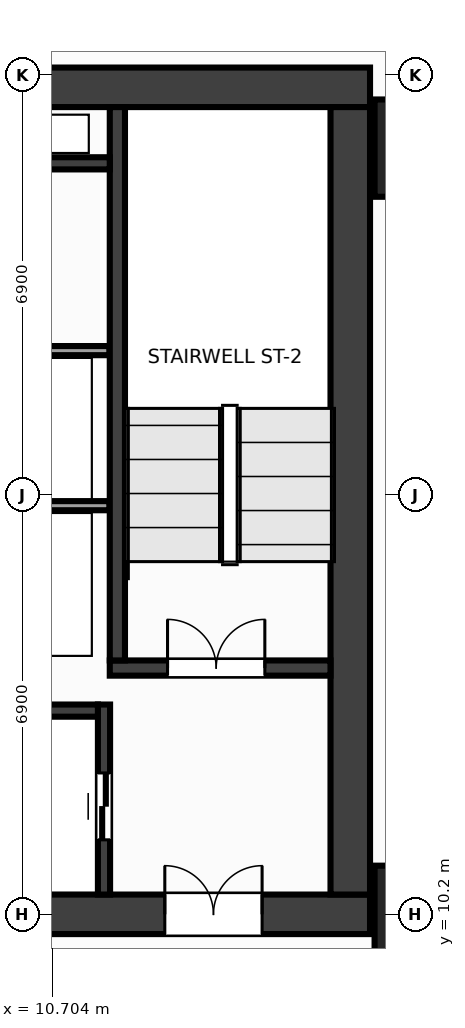
"""IFC4 building model, lengths in metres.
Left out: names, types, materials, properties, quantities, classifications, styles, units other than length and angle.
Written with IfcOpenShell. Run it as: python <this file> out.ifc"""

import sys

from ifc_helpers import new_model, si_unit, direction, frame, frame_2d, origin, origin_2d, place, context, subcontext, project, spatial, rectangle, extrude, source, transform, mapped, element, fill, save


model = new_model("IFC4")
c1 = context("Model", 3, precision=1e-05, world=origin(), true_north=direction((0.0, 1.0)))
c2 = subcontext(c1, "Body", "Model", "MODEL_VIEW")
j1 = project(units=[si_unit("LENGTHUNIT", "METRE"), si_unit("PLANEANGLEUNIT", "RADIAN")], contexts=[c1])
p1 = place(None, origin())
s1 = spatial("IfcSite", under=j1, at=p1, CompositionType="ELEMENT")
p2 = place(p1, origin())
s2 = spatial("IfcBuilding", under=s1, at=p2, CompositionType="ELEMENT")
p3 = place(p2, frame((0.0, 0.0, 138.8)))
s3 = spatial("IfcBuildingStorey", under=s2, at=p3, CompositionType="ELEMENT", Elevation=138.8)
m1 = source(origin(), c2, "Body", "SweptSolid", [
    extrude(rectangle(XDim=31.85, YDim=0.65, at=frame_2d((15.925, 0.0))), origin(), (0.0, 0.0, 1.0), 3.6),
])
p4 = place(p3, frame((-15.925, 23.8, 0.0), z_axis=(0.0, 0.0, 1.0), x_axis=(1.0, 0.0, 0.0)))
e1 = element("IfcWall", 1, at=p4, inside=s3, PredefinedType="SHEAR", context=c2, shape_type="MappedRepresentation", body=[
    mapped(m1, transform((0.0, 0.0, 0.0), x_axis=(1.0, 0.0, 0.0), y_axis=(0.0, 1.0, 0.0), z_axis=(0.0, 0.0, 1.0), scale=1.0)),
])
p5 = place(p3, frame((-15.925, 10.2, 0.0), z_axis=(0.0, 0.0, 1.0), x_axis=(1.0, 0.0, 0.0)))
e2 = element("IfcWall", 2, at=p5, inside=s3, PredefinedType="SHEAR", context=c2, shape_type="MappedRepresentation", body=[
    mapped(m1, transform((0.0, 0.0, 0.0), x_axis=(1.0, 0.0, 0.0), y_axis=(0.0, 1.0, 0.0), z_axis=(0.0, 0.0, 1.0), scale=1.0)),
])
p6 = place(p5, frame((1.775, 0.0, 0.0)))
e3 = element("IfcOpeningElement", 3, at=p6, cuts=e2, PredefinedType="OPENING", context=c2, shape_type="SweptSolid", body=[
    extrude(rectangle(XDim=1.6, YDim=2.15, at=frame_2d((0.8, 1.075))), frame((0.0, 0.337, 0.0), z_axis=(0.0, -1.0, 0.0), x_axis=(1.0, 0.0, 0.0)), (0.0, 0.0, 1.0), 0.674),
])
p7 = place(p5, frame((28.475, 0.0, 0.0)))
e4 = element("IfcOpeningElement", 4, at=p7, cuts=e2, PredefinedType="OPENING", context=c2, shape_type="SweptSolid", body=[
    extrude(rectangle(XDim=1.6, YDim=2.15, at=frame_2d((0.8, 1.075))), frame((0.0, 0.337, 0.0), z_axis=(0.0, -1.0, 0.0), x_axis=(1.0, 0.0, 0.0)), (0.0, 0.0, 1.0), 0.674),
])
p8 = place(p5, frame((15.175, 0.0, 0.0)))
e5 = element("IfcOpeningElement", 5, at=p8, cuts=e2, PredefinedType="OPENING", context=c2, shape_type="SweptSolid", body=[
    extrude(rectangle(XDim=1.5, YDim=2.2, at=frame_2d((0.75, 1.1))), frame((0.0, 0.337, 0.0), z_axis=(0.0, -1.0, 0.0), x_axis=(1.0, 0.0, 0.0)), (0.0, 0.0, 1.0), 0.674),
])
m2 = source(origin(), c2, "Body", "SweptSolid", [
    extrude(rectangle(XDim=12.95, YDim=0.65, at=frame_2d((6.475, 0.0))), origin(), (0.0, 0.0, 1.0), 3.6),
])
p9 = place(p3, frame((15.6, 10.525, 0.0), z_axis=(0.0, 0.0, 1.0), x_axis=(0.0, 1.0, 0.0)))
e6 = element("IfcWall", 6, at=p9, inside=s3, PredefinedType="SHEAR", context=c2, shape_type="MappedRepresentation", body=[
    mapped(m2, transform((0.0, 0.0, 0.0), x_axis=(1.0, 0.0, 0.0), y_axis=(0.0, 1.0, 0.0), z_axis=(0.0, 0.0, 1.0), scale=1.0)),
])
m3 = source(origin(), c2, "Body", "SweptSolid", [
    extrude(rectangle(XDim=3.63, YDim=0.25, at=frame_2d((1.815, 0.0))), origin(), (0.0, 0.0, 1.0), 3.6),
])
p10 = place(p3, frame((11.645, 14.25, 0.0), z_axis=(0.0, 0.0, 1.0), x_axis=(1.0, 0.0, 0.0)))
e7 = element("IfcWall", 7, at=p10, inside=s3, PredefinedType="SHEAR", context=c2, shape_type="MappedRepresentation", body=[
    mapped(m3, transform((0.0, 0.0, 0.0), x_axis=(1.0, 0.0, 0.0), y_axis=(0.0, 1.0, 0.0), z_axis=(0.0, 0.0, 1.0), scale=1.0)),
])
p11 = place(p10, frame((0.95, 0.0, 0.0)))
e8 = element("IfcOpeningElement", 8, at=p11, cuts=e7, PredefinedType="OPENING", context=c2, shape_type="SweptSolid", body=[
    extrude(rectangle(XDim=1.6, YDim=2.15, at=frame_2d((0.8, 1.075))), frame((0.0, 0.137, 0.0), z_axis=(0.0, -1.0, 0.0), x_axis=(1.0, 0.0, 0.0)), (0.0, 0.0, 1.0), 0.274),
])
m4 = source(origin(), c2, "Body", "SweptSolid", [
    extrude(rectangle(XDim=9.1, YDim=0.25, at=frame_2d((4.55, 0.0))), origin(), (0.0, 0.0, 1.0), 3.6),
])
p12 = place(p3, frame((11.77, 14.375, 0.0), z_axis=(0.0, 0.0, 1.0), x_axis=(0.0, 1.0, 0.0)))
e9 = element("IfcWall", 9, at=p12, inside=s3, PredefinedType="SHEAR", context=c2, shape_type="MappedRepresentation", body=[
    mapped(m4, transform((0.0, 0.0, 0.0), x_axis=(1.0, 0.0, 0.0), y_axis=(0.0, 1.0, 0.0), z_axis=(0.0, 0.0, 1.0), scale=1.0)),
])
m5 = source(origin(), c2, "Body", "SweptSolid", [
    extrude(rectangle(XDim=3.125, YDim=0.2, at=frame_2d((1.562, 0.0))), origin(), (0.0, 0.0, 1.0), 3.6),
])
p13 = place(p3, frame((11.55, 10.525, 0.0), z_axis=(0.0, 0.0, 1.0), x_axis=(0.0, 1.0, 0.0)))
e10 = element("IfcWall", 10, at=p13, inside=s3, PredefinedType="SHEAR", context=c2, shape_type="MappedRepresentation", body=[
    mapped(m5, transform((0.0, 0.0, 0.0), x_axis=(1.0, 0.0, 0.0), y_axis=(0.0, 1.0, 0.0), z_axis=(0.0, 0.0, 1.0), scale=1.0)),
])
p14 = place(p13, frame((0.9, 0.0, 0.0)))
e11 = element("IfcOpeningElement", 11, at=p14, cuts=e10, PredefinedType="OPENING", context=c2, shape_type="SweptSolid", body=[
    extrude(rectangle(XDim=1.1, YDim=2.15, at=frame_2d((0.55, 1.075))), frame((0.0, 0.112, 0.0), z_axis=(0.0, -1.0, 0.0), x_axis=(1.0, 0.0, 0.0)), (0.0, 0.0, 1.0), 0.224),
])
m6 = source(origin(), c2, "Body", "SweptSolid", [
    extrude(rectangle(XDim=2.825, YDim=0.2, at=frame_2d((1.413, 0.0))), origin(), (0.0, 0.0, 1.0), 3.6),
])
p15 = place(p3, frame((8.625, 13.55, 0.0), z_axis=(0.0, 0.0, 1.0), x_axis=(1.0, 0.0, 0.0)))
e12 = element("IfcWall", 12, at=p15, inside=s3, PredefinedType="SHEAR", context=c2, shape_type="MappedRepresentation", body=[
    mapped(m6, transform((0.0, 0.0, 0.0), x_axis=(1.0, 0.0, 0.0), y_axis=(0.0, 1.0, 0.0), z_axis=(0.0, 0.0, 1.0), scale=1.0)),
])
m7 = source(origin(), c2, "Body", "SweptSolid", [
    extrude(rectangle(XDim=3.02, YDim=0.2, at=frame_2d((1.51, 0.0))), origin(), (0.0, 0.0, 1.0), 3.6),
])
p16 = place(p3, frame((8.625, 22.55, 0.0), z_axis=(0.0, 0.0, 1.0), x_axis=(1.0, 0.0, 0.0)))
e13 = element("IfcWall", 13, at=p16, inside=s3, PredefinedType="SHEAR", context=c2, shape_type="MappedRepresentation", body=[
    mapped(m7, transform((0.0, 0.0, 0.0), x_axis=(1.0, 0.0, 0.0), y_axis=(0.0, 1.0, 0.0), z_axis=(0.0, 0.0, 1.0), scale=1.0)),
])
m8 = source(origin(), c2, "Body", "SweptSolid", [
    extrude(rectangle(XDim=1.6, YDim=1.6, at=origin_2d()), origin(), (0.0, 0.0, 1.0), 3.6),
])
for number, where, z_axis, x_axis in (
    (14, (16.8, 10.2, 0.0), (0.0, 0.0, 1.0), (1.0, 0.0, 0.0)),
    (15, (16.8, 22.8, 0.0), (0.0, 0.0, 1.0), (1.0, 0.0, 0.0)),
):
    element("IfcColumn", number, at=place(p3, frame(where, z_axis=z_axis, x_axis=x_axis)), inside=s3, PredefinedType="COLUMN", context=c2, shape_type="MappedRepresentation", body=[
        mapped(m8, transform((0.0, 0.0, 0.0), x_axis=(1.0, 0.0, 0.0), y_axis=(0.0, 1.0, 0.0), z_axis=(0.0, 0.0, 1.0), scale=1.0)),
    ])
m9 = source(origin(), c2, "Body", "SweptSolid", [
    extrude(rectangle(XDim=3.01, YDim=0.15, at=frame_2d((1.505, 0.0))), origin(), (0.0, 0.0, 1.0), 3.38),
])
for number, where, z_axis, x_axis in (
    (16, (8.63, 16.92, 0.0), (0.0, 0.0, 1.0), (1.0, 0.0, 0.0)),
    (17, (8.63, 19.47, 0.0), (0.0, 0.0, 1.0), (1.0, 0.0, 0.0)),
):
    element("IfcWall", number, at=place(p3, frame(where, z_axis=z_axis, x_axis=x_axis)), inside=s3, PredefinedType="PARTITIONING", context=c2, shape_type="MappedRepresentation", body=[
        mapped(m9, transform((0.0, 0.0, 0.0), x_axis=(1.0, 0.0, 0.0), y_axis=(0.0, 1.0, 0.0), z_axis=(0.0, 0.0, 1.0), scale=1.0)),
    ])
m10 = source(origin(), c2, "Body", "SweptSolid", [
    extrude(rectangle(XDim=1.6, YDim=2.15, at=frame_2d((0.8, 1.075))), frame((0.0, 0.025, 0.0), z_axis=(0.0, -1.0, 0.0), x_axis=(1.0, 0.0, 0.0)), (0.0, 0.0, 1.0), 0.05),
])
p17 = place(p11, origin())
e18 = element("IfcDoor", 18, at=p17, inside=s3, OperationType="DOUBLE_DOOR_SINGLE_SWING", PredefinedType="DOOR", context=c2, shape_type="MappedRepresentation", body=[
    mapped(m10, transform((0.0, 0.0, 0.0), x_axis=(1.0, 0.0, 0.0), y_axis=(0.0, 1.0, 0.0), z_axis=(0.0, 0.0, 1.0), scale=1.0)),
])
fill(e8, e18)
p18 = place(p7, origin())
e19 = element("IfcDoor", 19, at=p18, inside=s3, OperationType="DOUBLE_DOOR_SINGLE_SWING", PredefinedType="DOOR", context=c2, shape_type="MappedRepresentation", body=[
    mapped(m10, transform((0.0, 0.0, 0.0), x_axis=(1.0, 0.0, 0.0), y_axis=(0.0, 1.0, 0.0), z_axis=(0.0, 0.0, 1.0), scale=1.0)),
])
fill(e4, e19)
m11 = source(origin(), c2, "Body", "SweptSolid", [
    extrude(rectangle(XDim=1.1, YDim=2.15, at=frame_2d((0.55, 1.075))), frame((0.0, 0.025, 0.0), z_axis=(0.0, -1.0, 0.0), x_axis=(1.0, 0.0, 0.0)), (0.0, 0.0, 1.0), 0.05),
])
p19 = place(p14, origin())
e20 = element("IfcDoor", 20, at=p19, inside=s3, OperationType="DOUBLE_DOOR_SLIDING", PredefinedType="DOOR", context=c2, shape_type="MappedRepresentation", body=[
    mapped(m11, transform((0.0, 0.0, 0.0), x_axis=(1.0, 0.0, 0.0), y_axis=(0.0, 1.0, 0.0), z_axis=(0.0, 0.0, 1.0), scale=1.0)),
])
fill(e11, e20)
save(model, sys.argv[1])
